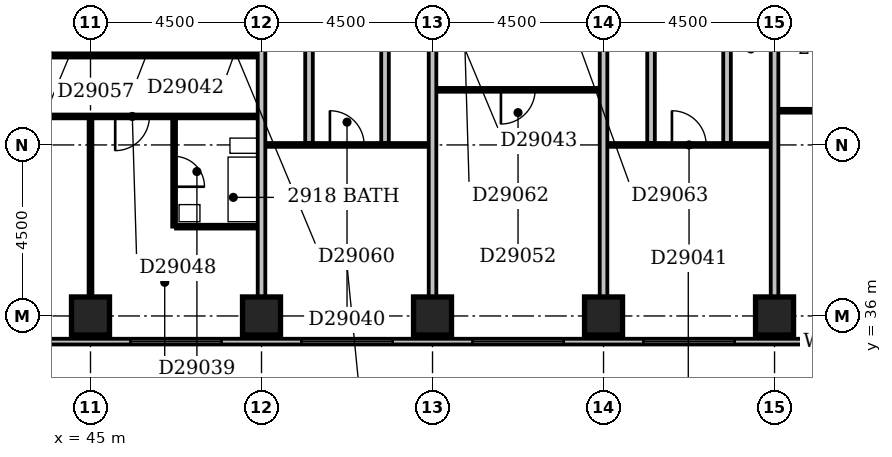
"""IFC4 building model, lengths in metres.
Left out: names, types, materials, properties, quantities, classifications, styles, units other than length and angle.
Written with IfcOpenShell. Run it as: python <this file> out.ifc"""

import sys

from ifc_helpers import new_model, si_unit, direction, frame, frame_2d, origin, origin_2d, place, context, subcontext, project, spatial, rectangle, extrude, element, fill, save


model = new_model("IFC4")
c1 = context("Model", 3, precision=1e-05, world=origin(), true_north=direction((0.0, 1.0)))
c2 = subcontext(c1, "Body", "Model", "MODEL_VIEW")
j1 = project(units=[si_unit("LENGTHUNIT", "METRE"), si_unit("PLANEANGLEUNIT", "RADIAN")], contexts=[c1])
p1 = place(None, origin())
s1 = spatial("IfcSite", under=j1, at=p1, CompositionType="ELEMENT")
p2 = place(p1, origin())
s2 = spatial("IfcBuilding", under=s1, at=p2, CompositionType="ELEMENT")
p3 = place(p2, frame((0.0, 0.0, 119.6)))
s3 = spatial("IfcBuildingStorey", under=s2, at=p3, CompositionType="ELEMENT", Elevation=119.6)
for number, where, z_axis, x_axis in (
    (1, (45.0, 36.0, -0.3), (0.0, 0.0, 1.0), (1.0, 0.0, 0.0)),
    (2, (49.5, 36.0, -0.3), (0.0, 0.0, 1.0), (1.0, 0.0, 0.0)),
    (3, (54.0, 36.0, -0.3), (0.0, 0.0, 1.0), (1.0, 0.0, 0.0)),
    (4, (58.5, 36.0, -0.3), (0.0, 0.0, 1.0), (1.0, 0.0, 0.0)),
    (5, (63.0, 36.0, -0.3), (0.0, 0.0, 1.0), (1.0, 0.0, 0.0)),
):
    element("IfcColumn", number, at=place(p3, frame(where, z_axis=z_axis, x_axis=x_axis)), inside=s3, PredefinedType="COLUMN", context=c2, shape_type="SweptSolid", body=[
        extrude(rectangle(XDim=1.0, YDim=1.0, at=origin_2d()), origin(), (0.0, 0.0, 1.0), 3.6),
    ])
p4 = place(p3, frame((23.1, 35.325, 0.0), z_axis=(0.0, 0.0, 1.0), x_axis=(1.0, 0.0, 0.0)))
e6 = element("IfcWall", 6, at=p4, inside=s3, PredefinedType="STANDARD", context=c2, shape_type="SweptSolid", body=[
    extrude(rectangle(XDim=45.15, YDim=0.15, at=frame_2d((22.575, 0.0))), origin(), (0.0, 0.0, 1.0), 2.7),
])
p5 = place(p4, frame((0.45, 0.0, 0.6)))
e7 = element("IfcOpeningElement", 7, at=p5, cuts=e6, PredefinedType="OPENING", context=c2, shape_type="SweptSolid", body=[
    extrude(rectangle(XDim=2.4, YDim=1.8, at=frame_2d((1.2, 0.9))), frame((0.0, 0.087, 0.0), z_axis=(0.0, -1.0, 0.0), x_axis=(1.0, 0.0, 0.0)), (0.0, 0.0, 1.0), 0.174),
])
p6 = place(p4, frame((4.95, 0.0, 0.6)))
e8 = element("IfcOpeningElement", 8, at=p6, cuts=e6, PredefinedType="OPENING", context=c2, shape_type="SweptSolid", body=[
    extrude(rectangle(XDim=2.4, YDim=1.8, at=frame_2d((1.2, 0.9))), frame((0.0, 0.087, 0.0), z_axis=(0.0, -1.0, 0.0), x_axis=(1.0, 0.0, 0.0)), (0.0, 0.0, 1.0), 0.174),
])
p7 = place(p4, frame((9.225, 0.0, 0.6)))
e9 = element("IfcOpeningElement", 9, at=p7, cuts=e6, PredefinedType="OPENING", context=c2, shape_type="SweptSolid", body=[
    extrude(rectangle(XDim=1.5, YDim=1.8, at=frame_2d((0.75, 0.9))), frame((0.0, 0.087, 0.0), z_axis=(0.0, -1.0, 0.0), x_axis=(1.0, 0.0, 0.0)), (0.0, 0.0, 1.0), 0.174),
])
p8 = place(p4, frame((15.146, 0.0, 0.6)))
e10 = element("IfcOpeningElement", 10, at=p8, cuts=e6, PredefinedType="OPENING", context=c2, shape_type="SweptSolid", body=[
    extrude(rectangle(XDim=1.5, YDim=1.8, at=frame_2d((0.75, 0.9))), frame((0.0, 0.087, 0.0), z_axis=(0.0, -1.0, 0.0), x_axis=(1.0, 0.0, 0.0)), (0.0, 0.0, 1.0), 0.174),
])
p9 = place(p4, frame((18.45, 0.0, 0.6)))
e11 = element("IfcOpeningElement", 11, at=p9, cuts=e6, PredefinedType="OPENING", context=c2, shape_type="SweptSolid", body=[
    extrude(rectangle(XDim=2.4, YDim=1.8, at=frame_2d((1.2, 0.9))), frame((0.0, 0.087, 0.0), z_axis=(0.0, -1.0, 0.0), x_axis=(1.0, 0.0, 0.0)), (0.0, 0.0, 1.0), 0.174),
])
p10 = place(p4, frame((22.95, 0.0, 0.6)))
e12 = element("IfcOpeningElement", 12, at=p10, cuts=e6, PredefinedType="OPENING", context=c2, shape_type="SweptSolid", body=[
    extrude(rectangle(XDim=2.4, YDim=1.8, at=frame_2d((1.2, 0.9))), frame((0.0, 0.087, 0.0), z_axis=(0.0, -1.0, 0.0), x_axis=(1.0, 0.0, 0.0)), (0.0, 0.0, 1.0), 0.174),
])
p11 = place(p4, frame((27.45, 0.0, 0.6)))
e13 = element("IfcOpeningElement", 13, at=p11, cuts=e6, PredefinedType="OPENING", context=c2, shape_type="SweptSolid", body=[
    extrude(rectangle(XDim=2.4, YDim=1.8, at=frame_2d((1.2, 0.9))), frame((0.0, 0.087, 0.0), z_axis=(0.0, -1.0, 0.0), x_axis=(1.0, 0.0, 0.0)), (0.0, 0.0, 1.0), 0.174),
])
p12 = place(p4, frame((31.95, 0.0, 0.6)))
e14 = element("IfcOpeningElement", 14, at=p12, cuts=e6, PredefinedType="OPENING", context=c2, shape_type="SweptSolid", body=[
    extrude(rectangle(XDim=2.4, YDim=1.8, at=frame_2d((1.2, 0.9))), frame((0.0, 0.087, 0.0), z_axis=(0.0, -1.0, 0.0), x_axis=(1.0, 0.0, 0.0)), (0.0, 0.0, 1.0), 0.174),
])
p13 = place(p4, frame((36.45, 0.0, 0.6)))
e15 = element("IfcOpeningElement", 15, at=p13, cuts=e6, PredefinedType="OPENING", context=c2, shape_type="SweptSolid", body=[
    extrude(rectangle(XDim=2.4, YDim=1.8, at=frame_2d((1.2, 0.9))), frame((0.0, 0.087, 0.0), z_axis=(0.0, -1.0, 0.0), x_axis=(1.0, 0.0, 0.0)), (0.0, 0.0, 1.0), 0.174),
])
p14 = place(p4, frame((40.631, 0.0, 0.6)))
e16 = element("IfcOpeningElement", 16, at=p14, cuts=e6, PredefinedType="OPENING", context=c2, shape_type="SweptSolid", body=[
    extrude(rectangle(XDim=0.9, YDim=1.8, at=frame_2d((0.45, 0.9))), frame((0.0, 0.087, 0.0), z_axis=(0.0, -1.0, 0.0), x_axis=(1.0, 0.0, 0.0)), (0.0, 0.0, 1.0), 0.174),
])
p15 = place(p3, frame((45.0, 36.5, 0.0), z_axis=(0.0, 0.0, 1.0), x_axis=(0.0, 1.0, 0.0)))
e17 = element("IfcWall", 17, at=p15, inside=s3, PredefinedType="PARTITIONING", context=c2, shape_type="SweptSolid", body=[
    extrude(rectangle(XDim=4.7, YDim=0.1, at=frame_2d((2.35, 0.0))), origin(), (0.0, 0.0, 1.0), 2.6),
])
p16 = place(p3, frame((49.5, 36.5, 0.0), z_axis=(0.0, 0.0, 1.0), x_axis=(0.0, 1.0, 0.0)))
e18 = element("IfcWall", 18, at=p16, inside=s3, PredefinedType="PARTITIONING", context=c2, shape_type="SweptSolid", body=[
    extrude(rectangle(XDim=12.9, YDim=0.2, at=frame_2d((6.45, 0.0))), origin(), (0.0, 0.0, 1.0), 3.3),
])
p17 = place(p3, frame((54.0, 36.5, 0.0), z_axis=(0.0, 0.0, 1.0), x_axis=(0.0, 1.0, 0.0)))
e19 = element("IfcWall", 19, at=p17, inside=s3, PredefinedType="PARTITIONING", context=c2, shape_type="SweptSolid", body=[
    extrude(rectangle(XDim=12.9, YDim=0.2, at=frame_2d((6.45, 0.0))), origin(), (0.0, 0.0, 1.0), 2.6),
])
p18 = place(p3, frame((58.5, 36.5, 0.0), z_axis=(0.0, 0.0, 1.0), x_axis=(0.0, 1.0, 0.0)))
e20 = element("IfcWall", 20, at=p18, inside=s3, PredefinedType="PARTITIONING", context=c2, shape_type="SweptSolid", body=[
    extrude(rectangle(XDim=12.9, YDim=0.2, at=frame_2d((6.45, 0.0))), origin(), (0.0, 0.0, 1.0), 3.3),
])
p19 = place(p3, frame((63.0, 36.5, 0.0), z_axis=(0.0, 0.0, 1.0), x_axis=(0.0, 1.0, 0.0)))
e21 = element("IfcWall", 21, at=p19, inside=s3, PredefinedType="PARTITIONING", context=c2, shape_type="SweptSolid", body=[
    extrude(rectangle(XDim=12.9, YDim=0.2, at=frame_2d((6.45, 0.0))), origin(), (0.0, 0.0, 1.0), 2.4),
])
p20 = place(p3, frame((47.2, 38.35, 0.0), z_axis=(0.0, 0.0, 1.0), x_axis=(0.0, 1.0, 0.0)))
e22 = element("IfcWall", 22, at=p20, inside=s3, PredefinedType="PLUMBINGWALL", context=c2, shape_type="SweptSolid", body=[
    extrude(rectangle(XDim=2.85, YDim=0.1, at=frame_2d((1.425, 0.0))), origin(), (0.0, 0.0, 1.0), 3.3),
])
p21 = place(p20, frame((1.05, 0.0, 0.0)))
e23 = element("IfcOpeningElement", 23, at=p21, cuts=e22, PredefinedType="OPENING", context=c2, shape_type="SweptSolid", body=[
    extrude(rectangle(XDim=0.8, YDim=2.1, at=frame_2d((0.4, 1.05))), frame((0.0, 0.062, 0.0), z_axis=(0.0, -1.0, 0.0), x_axis=(1.0, 0.0, 0.0)), (0.0, 0.0, 1.0), 0.124),
])
p22 = place(p3, frame((47.25, 38.35, 0.0), z_axis=(0.0, 0.0, 1.0), x_axis=(1.0, 0.0, 0.0)))
e24 = element("IfcWall", 24, at=p22, inside=s3, PredefinedType="PLUMBINGWALL", context=c2, shape_type="SweptSolid", body=[
    extrude(rectangle(XDim=2.15, YDim=0.1, at=frame_2d((1.075, 0.0))), origin(), (0.0, 0.0, 1.0), 3.3),
])
p23 = place(p3, frame((49.6, 40.5, 0.0), z_axis=(0.0, 0.0, 1.0), x_axis=(1.0, 0.0, 0.0)))
e25 = element("IfcWall", 25, at=p23, inside=s3, PredefinedType="PARTITIONING", context=c2, shape_type="SweptSolid", body=[
    extrude(rectangle(XDim=4.3, YDim=0.1, at=frame_2d((2.15, 0.0))), origin(), (0.0, 0.0, 1.0), 3.3),
])
p24 = place(p23, frame((1.7, 0.0, 0.0)))
e26 = element("IfcOpeningElement", 26, at=p24, cuts=e25, PredefinedType="OPENING", context=c2, shape_type="SweptSolid", body=[
    extrude(rectangle(XDim=0.9, YDim=2.1, at=frame_2d((0.45, 1.05))), frame((0.0, 0.062, 0.0), z_axis=(0.0, -1.0, 0.0), x_axis=(1.0, 0.0, 0.0)), (0.0, 0.0, 1.0), 0.124),
])
p25 = place(p3, frame((58.6, 40.5, 0.0), z_axis=(0.0, 0.0, 1.0), x_axis=(1.0, 0.0, 0.0)))
e27 = element("IfcWall", 27, at=p25, inside=s3, PredefinedType="PARTITIONING", context=c2, shape_type="SweptSolid", body=[
    extrude(rectangle(XDim=4.3, YDim=0.1, at=frame_2d((2.15, 0.0))), origin(), (0.0, 0.0, 1.0), 3.3),
])
p26 = place(p25, frame((1.7, 0.0, 0.0)))
e28 = element("IfcOpeningElement", 28, at=p26, cuts=e27, PredefinedType="OPENING", context=c2, shape_type="SweptSolid", body=[
    extrude(rectangle(XDim=0.9, YDim=2.1, at=frame_2d((0.45, 1.05))), frame((0.0, 0.062, 0.0), z_axis=(0.0, -1.0, 0.0), x_axis=(1.0, 0.0, 0.0)), (0.0, 0.0, 1.0), 0.124),
])
p27 = place(p3, frame((50.75, 40.55, 0.0), z_axis=(0.0, 0.0, 1.0), x_axis=(0.0, 1.0, 0.0)))
e29 = element("IfcWall", 29, at=p27, inside=s3, PredefinedType="PARTITIONING", context=c2, shape_type="SweptSolid", body=[
    extrude(rectangle(XDim=8.95, YDim=0.2, at=frame_2d((4.475, 0.0))), origin(), (0.0, 0.0, 1.0), 3.3),
])
p28 = place(p27, frame((5.55, 0.0, 0.0)))
e30 = element("IfcOpeningElement", 30, at=p28, cuts=e29, PredefinedType="OPENING", context=c2, shape_type="SweptSolid", body=[
    extrude(rectangle(XDim=0.8, YDim=2.1, at=frame_2d((0.4, 1.05))), frame((0.0, 0.112, 0.0), z_axis=(0.0, -1.0, 0.0), x_axis=(1.0, 0.0, 0.0)), (0.0, 0.0, 1.0), 0.224),
])
p29 = place(p3, frame((52.75, 40.55, 0.0), z_axis=(0.0, 0.0, 1.0), x_axis=(0.0, 1.0, 0.0)))
e31 = element("IfcWall", 31, at=p29, inside=s3, PredefinedType="PARTITIONING", context=c2, shape_type="SweptSolid", body=[
    extrude(rectangle(XDim=8.95, YDim=0.2, at=frame_2d((4.475, 0.0))), origin(), (0.0, 0.0, 1.0), 3.3),
])
p30 = place(p29, frame((5.55, 0.0, 0.0)))
e32 = element("IfcOpeningElement", 32, at=p30, cuts=e31, PredefinedType="OPENING", context=c2, shape_type="SweptSolid", body=[
    extrude(rectangle(XDim=0.8, YDim=2.1, at=frame_2d((0.4, 1.05))), frame((0.0, 0.112, 0.0), z_axis=(0.0, -1.0, 0.0), x_axis=(1.0, 0.0, 0.0)), (0.0, 0.0, 1.0), 0.224),
])
p31 = place(p3, frame((59.75, 40.55, 0.0), z_axis=(0.0, 0.0, 1.0), x_axis=(0.0, 1.0, 0.0)))
e33 = element("IfcWall", 33, at=p31, inside=s3, PredefinedType="PARTITIONING", context=c2, shape_type="SweptSolid", body=[
    extrude(rectangle(XDim=8.95, YDim=0.2, at=frame_2d((4.475, 0.0))), origin(), (0.0, 0.0, 1.0), 3.3),
])
p32 = place(p31, frame((5.55, 0.0, 0.0)))
e34 = element("IfcOpeningElement", 34, at=p32, cuts=e33, PredefinedType="OPENING", context=c2, shape_type="SweptSolid", body=[
    extrude(rectangle(XDim=0.8, YDim=2.1, at=frame_2d((0.4, 1.05))), frame((0.0, 0.112, 0.0), z_axis=(0.0, -1.0, 0.0), x_axis=(1.0, 0.0, 0.0)), (0.0, 0.0, 1.0), 0.224),
])
p33 = place(p3, frame((61.75, 40.55, 0.0), z_axis=(0.0, 0.0, 1.0), x_axis=(0.0, 1.0, 0.0)))
e35 = element("IfcWall", 35, at=p33, inside=s3, PredefinedType="PARTITIONING", context=c2, shape_type="SweptSolid", body=[
    extrude(rectangle(XDim=8.95, YDim=0.2, at=frame_2d((4.475, 0.0))), origin(), (0.0, 0.0, 1.0), 3.3),
])
p34 = place(p33, frame((5.55, 0.0, 0.0)))
e36 = element("IfcOpeningElement", 36, at=p34, cuts=e35, PredefinedType="OPENING", context=c2, shape_type="SweptSolid", body=[
    extrude(rectangle(XDim=0.8, YDim=2.1, at=frame_2d((0.4, 1.05))), frame((0.0, 0.112, 0.0), z_axis=(0.0, -1.0, 0.0), x_axis=(1.0, 0.0, 0.0)), (0.0, 0.0, 1.0), 0.224),
])
p35 = place(p3, frame((31.6, 41.25, 0.0), z_axis=(0.0, 0.0, 1.0), x_axis=(1.0, 0.0, 0.0)))
e37 = element("IfcWall", 37, at=p35, inside=s3, PredefinedType="PARTITIONING", context=c2, shape_type="SweptSolid", body=[
    extrude(rectangle(XDim=17.8, YDim=0.1, at=frame_2d((8.9, 0.0))), origin(), (0.0, 0.0, 1.0), 3.3),
])
p36 = place(p35, frame((2.85, 0.0, 0.0)))
e38 = element("IfcOpeningElement", 38, at=p36, cuts=e37, PredefinedType="OPENING", context=c2, shape_type="SweptSolid", body=[
    extrude(rectangle(XDim=0.9, YDim=2.1, at=frame_2d((0.45, 1.05))), frame((0.0, 0.062, 0.0), z_axis=(0.0, -1.0, 0.0), x_axis=(1.0, 0.0, 0.0)), (0.0, 0.0, 1.0), 0.124),
])
p37 = place(p35, frame((8.4, 0.0, 0.0)))
e39 = element("IfcOpeningElement", 39, at=p37, cuts=e37, PredefinedType="OPENING", context=c2, shape_type="SweptSolid", body=[
    extrude(rectangle(XDim=0.9, YDim=2.1, at=frame_2d((0.45, 1.05))), frame((0.0, 0.062, 0.0), z_axis=(0.0, -1.0, 0.0), x_axis=(1.0, 0.0, 0.0)), (0.0, 0.0, 1.0), 0.124),
])
p38 = place(p35, frame((14.05, 0.0, 0.0)))
e40 = element("IfcOpeningElement", 40, at=p38, cuts=e37, PredefinedType="OPENING", context=c2, shape_type="SweptSolid", body=[
    extrude(rectangle(XDim=0.9, YDim=2.1, at=frame_2d((0.45, 1.05))), frame((0.0, 0.062, 0.0), z_axis=(0.0, -1.0, 0.0), x_axis=(1.0, 0.0, 0.0)), (0.0, 0.0, 1.0), 0.124),
])
p39 = place(p3, frame((63.1, 41.4, 0.0), z_axis=(0.0, 0.0, 1.0), x_axis=(1.0, 0.0, 0.0)))
e41 = element("IfcWall", 41, at=p39, inside=s3, PredefinedType="PARTITIONING", context=c2, shape_type="SweptSolid", body=[
    extrude(rectangle(XDim=5.0, YDim=0.1, at=frame_2d((2.5, 0.0))), origin(), (0.0, 0.0, 1.0), 3.3),
])
p40 = place(p39, frame((1.7, 0.0, 0.0)))
e42 = element("IfcOpeningElement", 42, at=p40, cuts=e41, PredefinedType="OPENING", context=c2, shape_type="SweptSolid", body=[
    extrude(rectangle(XDim=0.9, YDim=2.1, at=frame_2d((0.45, 1.05))), frame((0.0, 0.062, 0.0), z_axis=(0.0, -1.0, 0.0), x_axis=(1.0, 0.0, 0.0)), (0.0, 0.0, 1.0), 0.124),
])
p41 = place(p3, frame((54.1, 41.95, 0.0), z_axis=(0.0, 0.0, 1.0), x_axis=(1.0, 0.0, 0.0)))
e43 = element("IfcWall", 43, at=p41, inside=s3, PredefinedType="PARTITIONING", context=c2, shape_type="SweptSolid", body=[
    extrude(rectangle(XDim=4.3, YDim=0.1, at=frame_2d((2.15, 0.0))), origin(), (0.0, 0.0, 1.0), 3.3),
])
p42 = place(p41, frame((1.7, 0.0, 0.0)))
e44 = element("IfcOpeningElement", 44, at=p42, cuts=e43, PredefinedType="OPENING", context=c2, shape_type="SweptSolid", body=[
    extrude(rectangle(XDim=0.9, YDim=2.1, at=frame_2d((0.45, 1.05))), frame((0.0, 0.062, 0.0), z_axis=(0.0, -1.0, 0.0), x_axis=(1.0, 0.0, 0.0)), (0.0, 0.0, 1.0), 0.124),
])
p43 = place(p3, frame((38.25, 42.85, 0.0), z_axis=(0.0, 0.0, 1.0), x_axis=(1.0, 0.0, 0.0)))
e45 = element("IfcWall", 45, at=p43, inside=s3, PredefinedType="PARTITIONING", context=c2, shape_type="SweptSolid", body=[
    extrude(rectangle(XDim=11.15, YDim=0.1, at=frame_2d((5.575, 0.0))), origin(), (0.0, 0.0, 1.0), 3.3),
])
p44 = place(p43, frame((0.75, 0.0, 0.0)))
e46 = element("IfcOpeningElement", 46, at=p44, cuts=e45, PredefinedType="OPENING", context=c2, shape_type="SweptSolid", body=[
    extrude(rectangle(XDim=0.8, YDim=2.1, at=frame_2d((0.4, 1.05))), frame((0.0, 0.062, 0.0), z_axis=(0.0, -1.0, 0.0), x_axis=(1.0, 0.0, 0.0)), (0.0, 0.0, 1.0), 0.124),
])
p45 = place(p43, frame((8.05, 0.0, 0.0)))
e47 = element("IfcOpeningElement", 47, at=p45, cuts=e45, PredefinedType="OPENING", context=c2, shape_type="SweptSolid", body=[
    extrude(rectangle(XDim=0.8, YDim=2.1, at=frame_2d((0.4, 1.05))), frame((0.0, 0.062, 0.0), z_axis=(0.0, -1.0, 0.0), x_axis=(1.0, 0.0, 0.0)), (0.0, 0.0, 1.0), 0.124),
])
p46 = place(p43, frame((4.25, 0.0, 0.0)))
e48 = element("IfcOpeningElement", 48, at=p46, cuts=e45, PredefinedType="OPENING", context=c2, shape_type="SweptSolid", body=[
    extrude(rectangle(XDim=0.8, YDim=2.1, at=frame_2d((0.4, 1.05))), frame((0.0, 0.062, 0.0), z_axis=(0.0, -1.0, 0.0), x_axis=(1.0, 0.0, 0.0)), (0.0, 0.0, 1.0), 0.124),
])
p47 = place(p43, frame((6.05, 0.0, 0.0)))
e49 = element("IfcOpeningElement", 49, at=p47, cuts=e45, PredefinedType="OPENING", context=c2, shape_type="SweptSolid", body=[
    extrude(rectangle(XDim=0.8, YDim=2.1, at=frame_2d((0.4, 1.05))), frame((0.0, 0.062, 0.0), z_axis=(0.0, -1.0, 0.0), x_axis=(1.0, 0.0, 0.0)), (0.0, 0.0, 1.0), 0.124),
])
p48 = place(p43, frame((9.95, 0.0, 0.0)))
e50 = element("IfcOpeningElement", 50, at=p48, cuts=e45, PredefinedType="OPENING", context=c2, shape_type="SweptSolid", body=[
    extrude(rectangle(XDim=0.8, YDim=2.1, at=frame_2d((0.4, 1.05))), frame((0.0, 0.062, 0.0), z_axis=(0.0, -1.0, 0.0), x_axis=(1.0, 0.0, 0.0)), (0.0, 0.0, 1.0), 0.124),
])
p49 = place(p43, frame((2.7, 0.0, 0.0)))
e51 = element("IfcOpeningElement", 51, at=p49, cuts=e45, PredefinedType="OPENING", context=c2, shape_type="SweptSolid", body=[
    extrude(rectangle(XDim=0.8, YDim=2.1, at=frame_2d((0.4, 1.05))), frame((0.0, 0.062, 0.0), z_axis=(0.0, -1.0, 0.0), x_axis=(1.0, 0.0, 0.0)), (0.0, 0.0, 1.0), 0.124),
])
p50 = place(p3, frame((45.7, 42.9, 0.0), z_axis=(0.0, 0.0, 1.0), x_axis=(0.0, 1.0, 0.0)))
e52 = element("IfcWall", 52, at=p50, inside=s3, PredefinedType="PARTITIONING", context=c2, shape_type="SweptSolid", body=[
    extrude(rectangle(XDim=6.5, YDim=0.1, at=frame_2d((3.25, 0.0))), origin(), (0.0, 0.0, 1.0), 2.6),
])
p51 = place(p3, frame((47.7, 42.9, 0.0), z_axis=(0.0, 0.0, 1.0), x_axis=(0.0, 1.0, 0.0)))
e53 = element("IfcWall", 53, at=p51, inside=s3, PredefinedType="PARTITIONING", context=c2, shape_type="SweptSolid", body=[
    extrude(rectangle(XDim=6.5, YDim=0.1, at=frame_2d((3.25, 0.0))), origin(), (0.0, 0.0, 1.0), 3.3),
])
p52 = place(p10, origin())
e54 = element("IfcWindow", 54, at=p52, inside=s3, PartitioningType="SINGLE_PANEL", PredefinedType="WINDOW", context=c2, shape_type="SweptSolid", body=[
    extrude(rectangle(XDim=2.4, YDim=1.8, at=frame_2d((1.2, 0.9))), frame((0.0, 0.03, 0.0), z_axis=(0.0, -1.0, 0.0), x_axis=(1.0, 0.0, 0.0)), (0.0, 0.0, 1.0), 0.06),
])
fill(e12, e54)
p53 = place(p11, origin())
e55 = element("IfcWindow", 55, at=p53, inside=s3, PartitioningType="SINGLE_PANEL", PredefinedType="WINDOW", context=c2, shape_type="SweptSolid", body=[
    extrude(rectangle(XDim=2.4, YDim=1.8, at=frame_2d((1.2, 0.9))), frame((0.0, 0.03, 0.0), z_axis=(0.0, -1.0, 0.0), x_axis=(1.0, 0.0, 0.0)), (0.0, 0.0, 1.0), 0.06),
])
fill(e13, e55)
p54 = place(p12, origin())
e56 = element("IfcWindow", 56, at=p54, inside=s3, PartitioningType="SINGLE_PANEL", PredefinedType="WINDOW", context=c2, shape_type="SweptSolid", body=[
    extrude(rectangle(XDim=2.4, YDim=1.8, at=frame_2d((1.2, 0.9))), frame((0.0, 0.03, 0.0), z_axis=(0.0, -1.0, 0.0), x_axis=(1.0, 0.0, 0.0)), (0.0, 0.0, 1.0), 0.06),
])
fill(e14, e56)
p55 = place(p13, origin())
e57 = element("IfcWindow", 57, at=p55, inside=s3, PartitioningType="SINGLE_PANEL", PredefinedType="WINDOW", context=c2, shape_type="SweptSolid", body=[
    extrude(rectangle(XDim=2.4, YDim=1.8, at=frame_2d((1.2, 0.9))), frame((0.0, 0.03, 0.0), z_axis=(0.0, -1.0, 0.0), x_axis=(1.0, 0.0, 0.0)), (0.0, 0.0, 1.0), 0.06),
])
fill(e15, e57)
p56 = place(p14, origin())
e58 = element("IfcWindow", 58, at=p56, inside=s3, PartitioningType="SINGLE_PANEL", PredefinedType="WINDOW", context=c2, shape_type="SweptSolid", body=[
    extrude(rectangle(XDim=0.9, YDim=1.8, at=frame_2d((0.45, 0.9))), frame((0.0, 0.03, 0.0), z_axis=(0.0, -1.0, 0.0), x_axis=(1.0, 0.0, 0.0)), (0.0, 0.0, 1.0), 0.06),
])
fill(e16, e58)
p57 = place(p21, frame((0.8, 0.0, 0.0), z_axis=(0.0, 0.0, 1.0), x_axis=(-1.0, 0.0, 0.0)))
e59 = element("IfcDoor", 59, at=p57, inside=s3, OperationType="SINGLE_SWING_RIGHT", PredefinedType="DOOR", context=c2, shape_type="SweptSolid", body=[
    extrude(rectangle(XDim=0.8, YDim=2.1, at=frame_2d((0.4, 1.05))), frame((0.0, 0.025, 0.0), z_axis=(0.0, -1.0, 0.0), x_axis=(1.0, 0.0, 0.0)), (0.0, 0.0, 1.0), 0.05),
])
fill(e23, e59)
p58 = place(p24, origin())
e60 = element("IfcDoor", 60, at=p58, inside=s3, OperationType="SINGLE_SWING_LEFT", PredefinedType="DOOR", context=c2, shape_type="SweptSolid", body=[
    extrude(rectangle(XDim=0.9, YDim=2.1, at=frame_2d((0.45, 1.05))), frame((0.0, 0.025, 0.0), z_axis=(0.0, -1.0, 0.0), x_axis=(1.0, 0.0, 0.0)), (0.0, 0.0, 1.0), 0.05),
])
fill(e26, e60)
p59 = place(p26, origin())
e61 = element("IfcDoor", 61, at=p59, inside=s3, OperationType="SINGLE_SWING_LEFT", PredefinedType="DOOR", context=c2, shape_type="SweptSolid", body=[
    extrude(rectangle(XDim=0.9, YDim=2.1, at=frame_2d((0.45, 1.05))), frame((0.0, 0.025, 0.0), z_axis=(0.0, -1.0, 0.0), x_axis=(1.0, 0.0, 0.0)), (0.0, 0.0, 1.0), 0.05),
])
fill(e28, e61)
p60 = place(p38, frame((0.9, 0.0, 0.0), z_axis=(0.0, 0.0, 1.0), x_axis=(-1.0, 0.0, 0.0)))
e62 = element("IfcDoor", 62, at=p60, inside=s3, OperationType="SINGLE_SWING_RIGHT", PredefinedType="DOOR", context=c2, shape_type="SweptSolid", body=[
    extrude(rectangle(XDim=0.9, YDim=2.1, at=frame_2d((0.45, 1.05))), frame((0.0, 0.025, 0.0), z_axis=(0.0, -1.0, 0.0), x_axis=(1.0, 0.0, 0.0)), (0.0, 0.0, 1.0), 0.05),
])
fill(e40, e62)
p61 = place(p42, frame((0.9, 0.0, 0.0), z_axis=(0.0, 0.0, 1.0), x_axis=(-1.0, 0.0, 0.0)))
e63 = element("IfcDoor", 63, at=p61, inside=s3, OperationType="SINGLE_SWING_RIGHT", PredefinedType="DOOR", context=c2, shape_type="SweptSolid", body=[
    extrude(rectangle(XDim=0.9, YDim=2.1, at=frame_2d((0.45, 1.05))), frame((0.0, 0.025, 0.0), z_axis=(0.0, -1.0, 0.0), x_axis=(1.0, 0.0, 0.0)), (0.0, 0.0, 1.0), 0.05),
])
fill(e44, e63)
p62 = place(p45, origin())
e64 = element("IfcDoor", 64, at=p62, inside=s3, OperationType="SINGLE_SWING_LEFT", PredefinedType="DOOR", context=c2, shape_type="SweptSolid", body=[
    extrude(rectangle(XDim=0.8, YDim=2.1, at=frame_2d((0.4, 1.05))), frame((0.0, 0.025, 0.0), z_axis=(0.0, -1.0, 0.0), x_axis=(1.0, 0.0, 0.0)), (0.0, 0.0, 1.0), 0.05),
])
fill(e47, e64)
p63 = place(p47, origin())
e65 = element("IfcDoor", 65, at=p63, inside=s3, OperationType="SINGLE_SWING_LEFT", PredefinedType="DOOR", context=c2, shape_type="SweptSolid", body=[
    extrude(rectangle(XDim=0.8, YDim=2.1, at=frame_2d((0.4, 1.05))), frame((0.0, 0.025, 0.0), z_axis=(0.0, -1.0, 0.0), x_axis=(1.0, 0.0, 0.0)), (0.0, 0.0, 1.0), 0.05),
])
fill(e49, e65)
p64 = place(p48, origin())
e66 = element("IfcDoor", 66, at=p64, inside=s3, OperationType="SINGLE_SWING_LEFT", PredefinedType="DOOR", context=c2, shape_type="SweptSolid", body=[
    extrude(rectangle(XDim=0.8, YDim=2.1, at=frame_2d((0.4, 1.05))), frame((0.0, 0.025, 0.0), z_axis=(0.0, -1.0, 0.0), x_axis=(1.0, 0.0, 0.0)), (0.0, 0.0, 1.0), 0.05),
])
fill(e50, e66)
save(model, sys.argv[1])
